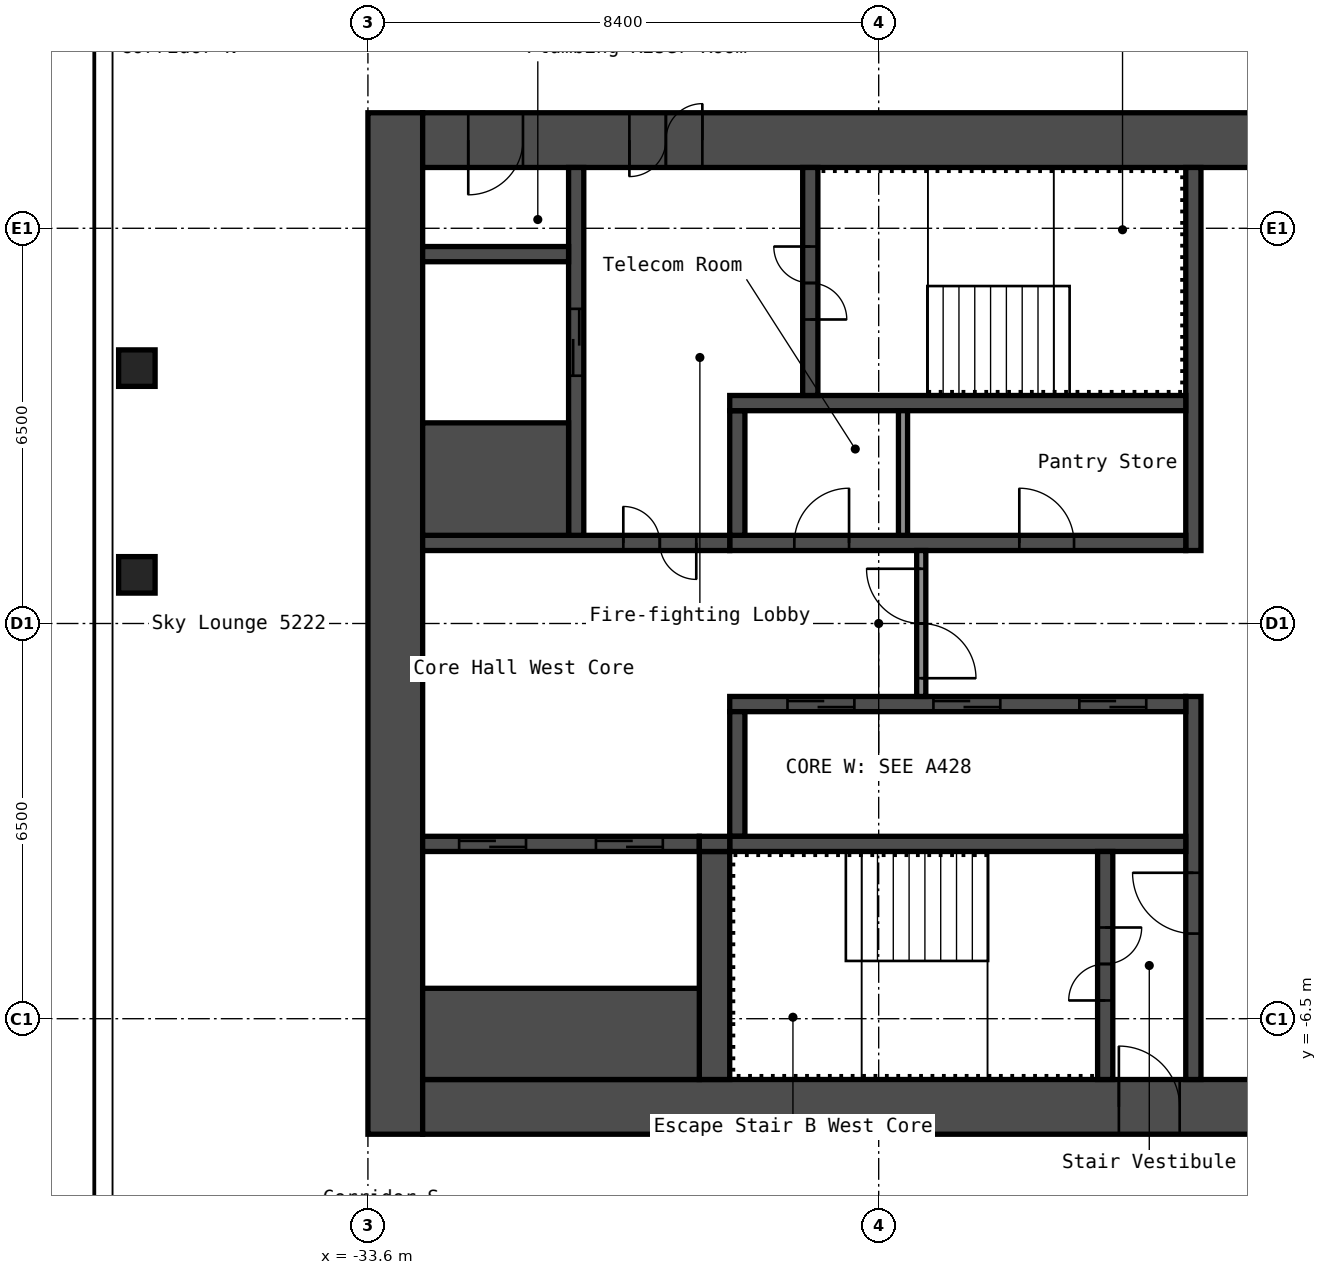
"""IFC4 building model, lengths in metres.
Left out: names, types, materials, properties, quantities, classifications, styles, units other than length and angle.
Written with IfcOpenShell. Run it as: python <this file> out.ifc"""

import sys

from ifc_helpers import new_model, si_unit, direction, frame, frame_2d, origin, origin_2d, place, context, subcontext, project, spatial, rectangle, hollow_rectangle, extrude, element, fill, save


model = new_model("IFC4")
c1 = context("Model", 3, precision=1e-05, world=origin(), true_north=direction((0.0, 1.0)))
c2 = subcontext(c1, "Body", "Model", "MODEL_VIEW")
j1 = project(units=[si_unit("LENGTHUNIT", "METRE"), si_unit("PLANEANGLEUNIT", "RADIAN")], contexts=[c1])
p1 = place(None, origin())
s1 = spatial("IfcSite", under=j1, at=p1, CompositionType="ELEMENT")
p2 = place(p1, origin())
s2 = spatial("IfcBuilding", under=s1, at=p2, CompositionType="ELEMENT")
p3 = place(p2, frame((0.0, 0.0, 186.6)))
s3 = spatial("IfcBuildingStorey", under=s2, at=p3, CompositionType="ELEMENT", Elevation=186.6)
for number, where, z_axis, x_axis in (
    (1, (-37.4, 0.8, 0.0), (0.0, 0.0, 1.0), (1.0, 0.0, 0.0)),
    (2, (-37.4, 4.2, 0.0), (0.0, 0.0, 1.0), (1.0, 0.0, 0.0)),
):
    element("IfcColumn", number, at=place(p3, frame(where, z_axis=z_axis, x_axis=x_axis)), inside=s3, PredefinedType="COLUMN", context=c2, shape_type="SweptSolid", body=[
        extrude(hollow_rectangle(XDim=0.6, YDim=0.6, WallThickness=0.025, InnerFilletRadius=0.038, OuterFilletRadius=0.062, at=origin_2d()), origin(), (0.0, 0.0, 1.0), 2.75),
    ])
p4 = place(p3, frame((-33.15, -8.4, 0.0), z_axis=(0.0, 0.0, 1.0), x_axis=(0.0, 1.0, 0.0)))
e3 = element("IfcWall", 3, at=p4, inside=s3, PredefinedType="SHEAR", context=c2, shape_type="SweptSolid", body=[
    extrude(rectangle(XDim=16.8, YDim=0.9, at=frame_2d((8.4, 0.0))), origin(), (0.0, 0.0, 1.0), 2.75),
])
p5 = place(p3, frame((-32.7, 7.95, 0.0), z_axis=(0.0, 0.0, 1.0), x_axis=(1.0, 0.0, 0.0)))
e4 = element("IfcWall", 4, at=p5, inside=s3, PredefinedType="SHEAR", context=c2, shape_type="SweptSolid", body=[
    extrude(rectangle(XDim=15.0, YDim=0.9, at=frame_2d((7.5, 0.0))), origin(), (0.0, 0.0, 1.0), 2.75),
])
p6 = place(p5, frame((3.4, 0.0, 0.0)))
e5 = element("IfcOpeningElement", 5, at=p6, cuts=e4, PredefinedType="OPENING", context=c2, shape_type="SweptSolid", body=[
    extrude(rectangle(XDim=1.2, YDim=2.1, at=frame_2d((0.6, 1.05))), frame((0.0, 0.46, 0.0), z_axis=(0.0, -1.0, 0.0), x_axis=(1.0, 0.0, 0.0)), (0.0, 0.0, 1.0), 0.92),
])
p7 = place(p5, frame((0.75, 0.0, 0.0)))
e6 = element("IfcOpeningElement", 6, at=p7, cuts=e4, PredefinedType="OPENING", context=c2, shape_type="SweptSolid", body=[
    extrude(rectangle(XDim=0.9, YDim=2.1, at=frame_2d((0.45, 1.05))), frame((0.0, 0.46, 0.0), z_axis=(0.0, -1.0, 0.0), x_axis=(1.0, 0.0, 0.0)), (0.0, 0.0, 1.0), 0.92),
])
p8 = place(p3, frame((-32.7, -7.95, 0.0), z_axis=(0.0, 0.0, 1.0), x_axis=(1.0, 0.0, 0.0)))
e7 = element("IfcWall", 7, at=p8, inside=s3, PredefinedType="SHEAR", context=c2, shape_type="SweptSolid", body=[
    extrude(rectangle(XDim=15.0, YDim=0.9, at=frame_2d((7.5, 0.0))), origin(), (0.0, 0.0, 1.0), 2.75),
])
p9 = place(p8, frame((11.45, 0.0, 0.0)))
e8 = element("IfcOpeningElement", 8, at=p9, cuts=e7, PredefinedType="OPENING", context=c2, shape_type="SweptSolid", body=[
    extrude(rectangle(XDim=1.0, YDim=2.1, at=frame_2d((0.5, 1.05))), frame((0.0, 0.46, 0.0), z_axis=(0.0, -1.0, 0.0), x_axis=(1.0, 0.0, 0.0)), (0.0, 0.0, 1.0), 0.92),
])
p10 = place(p3, frame((-20.025, 1.2, 0.0), z_axis=(0.0, 0.0, 1.0), x_axis=(0.0, 1.0, 0.0)))
e9 = element("IfcWall", 9, at=p10, inside=s3, PredefinedType="SHEAR", context=c2, shape_type="SweptSolid", body=[
    extrude(rectangle(XDim=6.3, YDim=0.25, at=frame_2d((3.15, 0.0))), origin(), (0.0, 0.0, 1.0), 2.75),
])
p11 = place(p3, frame((-20.025, -7.5, 0.0), z_axis=(0.0, 0.0, 1.0), x_axis=(0.0, 1.0, 0.0)))
e10 = element("IfcWall", 10, at=p11, inside=s3, PredefinedType="SHEAR", context=c2, shape_type="SweptSolid", body=[
    extrude(rectangle(XDim=6.3, YDim=0.25, at=frame_2d((3.15, 0.0))), origin(), (0.0, 0.0, 1.0), 2.75),
])
p12 = place(p11, frame((2.4, 0.0, 0.0)))
e11 = element("IfcOpeningElement", 11, at=p12, cuts=e10, PredefinedType="OPENING", context=c2, shape_type="SweptSolid", body=[
    extrude(rectangle(XDim=1.0, YDim=2.1, at=frame_2d((0.5, 1.05))), frame((0.0, 0.135, 0.0), z_axis=(0.0, -1.0, 0.0), x_axis=(1.0, 0.0, 0.0)), (0.0, 0.0, 1.0), 0.27),
])
p13 = place(p3, frame((-27.65, 1.325, 0.0), z_axis=(0.0, 0.0, 1.0), x_axis=(1.0, 0.0, 0.0)))
e12 = element("IfcWall", 12, at=p13, inside=s3, PredefinedType="SHEAR", context=c2, shape_type="SweptSolid", body=[
    extrude(rectangle(XDim=7.5, YDim=0.25, at=frame_2d((3.75, 0.0))), origin(), (0.0, 0.0, 1.0), 2.75),
])
p14 = place(p13, frame((4.762, 0.0, 0.0)))
e13 = element("IfcOpeningElement", 13, at=p14, cuts=e12, PredefinedType="OPENING", context=c2, shape_type="SweptSolid", body=[
    extrude(rectangle(XDim=0.9, YDim=2.1, at=frame_2d((0.45, 1.05))), frame((0.0, 0.135, 0.0), z_axis=(0.0, -1.0, 0.0), x_axis=(1.0, 0.0, 0.0)), (0.0, 0.0, 1.0), 0.27),
])
p15 = place(p13, frame((1.062, 0.0, 0.0)))
e14 = element("IfcOpeningElement", 14, at=p15, cuts=e12, PredefinedType="OPENING", context=c2, shape_type="SweptSolid", body=[
    extrude(rectangle(XDim=0.9, YDim=2.1, at=frame_2d((0.45, 1.05))), frame((0.0, 0.135, 0.0), z_axis=(0.0, -1.0, 0.0), x_axis=(1.0, 0.0, 0.0)), (0.0, 0.0, 1.0), 0.27),
])
p16 = place(p3, frame((-27.525, 1.45, 0.0), z_axis=(0.0, 0.0, 1.0), x_axis=(0.0, 1.0, 0.0)))
e15 = element("IfcWall", 15, at=p16, inside=s3, PredefinedType="SHEAR", context=c2, shape_type="SweptSolid", body=[
    extrude(rectangle(XDim=2.05, YDim=0.25, at=frame_2d((1.025, 0.0))), origin(), (0.0, 0.0, 1.0), 2.75),
])
p17 = place(p3, frame((-27.65, 3.625, 0.0), z_axis=(0.0, 0.0, 1.0), x_axis=(1.0, 0.0, 0.0)))
e16 = element("IfcWall", 16, at=p17, inside=s3, PredefinedType="SHEAR", context=c2, shape_type="SweptSolid", body=[
    extrude(rectangle(XDim=7.5, YDim=0.25, at=frame_2d((3.75, 0.0))), origin(), (0.0, 0.0, 1.0), 2.75),
])
p18 = place(p3, frame((-26.325, 3.75, 0.0), z_axis=(0.0, 0.0, 1.0), x_axis=(0.0, 1.0, 0.0)))
e17 = element("IfcWall", 17, at=p18, inside=s3, PredefinedType="SHEAR", context=c2, shape_type="SweptSolid", body=[
    extrude(rectangle(XDim=3.75, YDim=0.25, at=frame_2d((1.875, 0.0))), origin(), (0.0, 0.0, 1.0), 2.75),
])
p19 = place(p18, frame((1.25, 0.0, 0.0)))
e18 = element("IfcOpeningElement", 18, at=p19, cuts=e17, PredefinedType="OPENING", context=c2, shape_type="SweptSolid", body=[
    extrude(rectangle(XDim=1.2, YDim=2.1, at=frame_2d((0.6, 1.05))), frame((0.0, 0.135, 0.0), z_axis=(0.0, -1.0, 0.0), x_axis=(1.0, 0.0, 0.0)), (0.0, 0.0, 1.0), 0.27),
])
p20 = place(p3, frame((-32.7, 1.325, 0.0), z_axis=(0.0, 0.0, 1.0), x_axis=(1.0, 0.0, 0.0)))
e19 = element("IfcWall", 19, at=p20, inside=s3, PredefinedType="SHEAR", context=c2, shape_type="SweptSolid", body=[
    extrude(rectangle(XDim=5.05, YDim=0.25, at=frame_2d((2.525, 0.0))), origin(), (0.0, 0.0, 1.0), 2.75),
])
p21 = place(p20, frame((3.3, 0.0, 0.0)))
e20 = element("IfcOpeningElement", 20, at=p21, cuts=e19, PredefinedType="OPENING", context=c2, shape_type="SweptSolid", body=[
    extrude(rectangle(XDim=1.2, YDim=2.1, at=frame_2d((0.6, 1.05))), frame((0.0, 0.135, 0.0), z_axis=(0.0, -1.0, 0.0), x_axis=(1.0, 0.0, 0.0)), (0.0, 0.0, 1.0), 0.27),
])
p22 = place(p3, frame((-30.175, 1.45, 0.0), z_axis=(0.0, 0.0, 1.0), x_axis=(0.0, 1.0, 0.0)))
e21 = element("IfcWall", 21, at=p22, inside=s3, PredefinedType="SHEAR", context=c2, shape_type="SweptSolid", body=[
    extrude(rectangle(XDim=6.05, YDim=0.25, at=frame_2d((3.025, 0.0))), origin(), (0.0, 0.0, 1.0), 2.75),
])
p23 = place(p22, frame((2.625, 0.0, 0.0)))
e22 = element("IfcOpeningElement", 22, at=p23, cuts=e21, PredefinedType="OPENING", context=c2, shape_type="SweptSolid", body=[
    extrude(rectangle(XDim=1.1, YDim=2.1, at=frame_2d((0.55, 1.05))), frame((0.0, 0.135, 0.0), z_axis=(0.0, -1.0, 0.0), x_axis=(1.0, 0.0, 0.0)), (0.0, 0.0, 1.0), 0.27),
])
p24 = place(p3, frame((-32.7, 2.375, 0.0), z_axis=(0.0, 0.0, 1.0), x_axis=(1.0, 0.0, 0.0)))
e23 = element("IfcWall", 23, at=p24, inside=s3, PredefinedType="SHEAR", context=c2, shape_type="SweptSolid", body=[
    extrude(rectangle(XDim=2.4, YDim=1.85, at=frame_2d((1.2, 0.0))), origin(), (0.0, 0.0, 1.0), 2.75),
])
p25 = place(p3, frame((-32.7, 6.075, 0.0), z_axis=(0.0, 0.0, 1.0), x_axis=(1.0, 0.0, 0.0)))
e24 = element("IfcWall", 24, at=p25, inside=s3, PredefinedType="SHEAR", context=c2, shape_type="SweptSolid", body=[
    extrude(rectangle(XDim=2.4, YDim=0.25, at=frame_2d((1.2, 0.0))), origin(), (0.0, 0.0, 1.0), 2.75),
])
p26 = place(p3, frame((-27.65, -1.325, 0.0), z_axis=(0.0, 0.0, 1.0), x_axis=(1.0, 0.0, 0.0)))
e25 = element("IfcWall", 25, at=p26, inside=s3, PredefinedType="SHEAR", context=c2, shape_type="SweptSolid", body=[
    extrude(rectangle(XDim=7.5, YDim=0.25, at=frame_2d((3.75, 0.0))), origin(), (0.0, 0.0, 1.0), 2.75),
])
p27 = place(p26, frame((5.75, 0.0, 0.0)))
e26 = element("IfcOpeningElement", 26, at=p27, cuts=e25, PredefinedType="OPENING", context=c2, shape_type="SweptSolid", body=[
    extrude(rectangle(XDim=1.1, YDim=2.1, at=frame_2d((0.55, 1.05))), frame((0.0, 0.135, 0.0), z_axis=(0.0, -1.0, 0.0), x_axis=(1.0, 0.0, 0.0)), (0.0, 0.0, 1.0), 0.27),
])
p28 = place(p26, frame((3.35, 0.0, 0.0)))
e27 = element("IfcOpeningElement", 27, at=p28, cuts=e25, PredefinedType="OPENING", context=c2, shape_type="SweptSolid", body=[
    extrude(rectangle(XDim=1.1, YDim=2.1, at=frame_2d((0.55, 1.05))), frame((0.0, 0.135, 0.0), z_axis=(0.0, -1.0, 0.0), x_axis=(1.0, 0.0, 0.0)), (0.0, 0.0, 1.0), 0.27),
])
p29 = place(p26, frame((0.95, 0.0, 0.0)))
e28 = element("IfcOpeningElement", 28, at=p29, cuts=e25, PredefinedType="OPENING", context=c2, shape_type="SweptSolid", body=[
    extrude(rectangle(XDim=1.1, YDim=2.1, at=frame_2d((0.55, 1.05))), frame((0.0, 0.135, 0.0), z_axis=(0.0, -1.0, 0.0), x_axis=(1.0, 0.0, 0.0)), (0.0, 0.0, 1.0), 0.27),
])
p30 = place(p3, frame((-27.525, -3.5, 0.0), z_axis=(0.0, 0.0, 1.0), x_axis=(0.0, 1.0, 0.0)))
e29 = element("IfcWall", 29, at=p30, inside=s3, PredefinedType="SHEAR", context=c2, shape_type="SweptSolid", body=[
    extrude(rectangle(XDim=2.05, YDim=0.25, at=frame_2d((1.025, 0.0))), origin(), (0.0, 0.0, 1.0), 2.75),
])
p31 = place(p3, frame((-27.65, -3.625, 0.0), z_axis=(0.0, 0.0, 1.0), x_axis=(1.0, 0.0, 0.0)))
e30 = element("IfcWall", 30, at=p31, inside=s3, PredefinedType="SHEAR", context=c2, shape_type="SweptSolid", body=[
    extrude(rectangle(XDim=7.5, YDim=0.25, at=frame_2d((3.75, 0.0))), origin(), (0.0, 0.0, 1.0), 2.75),
])
p32 = place(p3, frame((-21.475, -7.5, 0.0), z_axis=(0.0, 0.0, 1.0), x_axis=(0.0, 1.0, 0.0)))
e31 = element("IfcWall", 31, at=p32, inside=s3, PredefinedType="SHEAR", context=c2, shape_type="SweptSolid", body=[
    extrude(rectangle(XDim=3.75, YDim=0.25, at=frame_2d((1.875, 0.0))), origin(), (0.0, 0.0, 1.0), 2.75),
])
p33 = place(p32, frame((1.3, 0.0, 0.0)))
e32 = element("IfcOpeningElement", 32, at=p33, cuts=e31, PredefinedType="OPENING", context=c2, shape_type="SweptSolid", body=[
    extrude(rectangle(XDim=1.2, YDim=2.1, at=frame_2d((0.6, 1.05))), frame((0.0, 0.135, 0.0), z_axis=(0.0, -1.0, 0.0), x_axis=(1.0, 0.0, 0.0)), (0.0, 0.0, 1.0), 0.27),
])
p34 = place(p3, frame((-27.9, -7.5, 0.0), z_axis=(0.0, 0.0, 1.0), x_axis=(0.0, 1.0, 0.0)))
e33 = element("IfcWall", 33, at=p34, inside=s3, PredefinedType="SHEAR", context=c2, shape_type="SweptSolid", body=[
    extrude(rectangle(XDim=3.75, YDim=0.5, at=frame_2d((1.875, 0.0))), origin(), (0.0, 0.0, 1.0), 2.75),
])
p35 = place(p3, frame((-32.7, -3.625, 0.0), z_axis=(0.0, 0.0, 1.0), x_axis=(1.0, 0.0, 0.0)))
e34 = element("IfcWall", 34, at=p35, inside=s3, PredefinedType="SHEAR", context=c2, shape_type="SweptSolid", body=[
    extrude(rectangle(XDim=4.55, YDim=0.25, at=frame_2d((2.275, 0.0))), origin(), (0.0, 0.0, 1.0), 2.75),
])
p36 = place(p35, frame((2.85, 0.0, 0.0)))
e35 = element("IfcOpeningElement", 35, at=p36, cuts=e34, PredefinedType="OPENING", context=c2, shape_type="SweptSolid", body=[
    extrude(rectangle(XDim=1.1, YDim=2.1, at=frame_2d((0.55, 1.05))), frame((0.0, 0.135, 0.0), z_axis=(0.0, -1.0, 0.0), x_axis=(1.0, 0.0, 0.0)), (0.0, 0.0, 1.0), 0.27),
])
p37 = place(p35, frame((0.6, 0.0, 0.0)))
e36 = element("IfcOpeningElement", 36, at=p37, cuts=e34, PredefinedType="OPENING", context=c2, shape_type="SweptSolid", body=[
    extrude(rectangle(XDim=1.1, YDim=2.1, at=frame_2d((0.55, 1.05))), frame((0.0, 0.135, 0.0), z_axis=(0.0, -1.0, 0.0), x_axis=(1.0, 0.0, 0.0)), (0.0, 0.0, 1.0), 0.27),
])
p38 = place(p3, frame((-32.7, -6.75, 0.0), z_axis=(0.0, 0.0, 1.0), x_axis=(1.0, 0.0, 0.0)))
e37 = element("IfcWall", 37, at=p38, inside=s3, PredefinedType="SHEAR", context=c2, shape_type="SweptSolid", body=[
    extrude(rectangle(XDim=4.55, YDim=1.5, at=frame_2d((2.275, 0.0))), origin(), (0.0, 0.0, 1.0), 2.75),
])
p39 = place(p3, frame((-28.15, -3.625, 0.0), z_axis=(0.0, 0.0, 1.0), x_axis=(1.0, 0.0, 0.0)))
e38 = element("IfcWall", 38, at=p39, inside=s3, PredefinedType="SHEAR", context=c2, shape_type="SweptSolid", body=[
    extrude(rectangle(XDim=0.5, YDim=0.25, at=frame_2d((0.25, 0.0))), origin(), (0.0, 0.0, 1.0), 2.75),
])
p40 = place(p3, frame((-24.5, -1.2, 0.0), z_axis=(0.0, 0.0, 1.0), x_axis=(0.0, 1.0, 0.0)))
e39 = element("IfcWall", 39, at=p40, inside=s3, PredefinedType="PARTITIONING", context=c2, shape_type="SweptSolid", body=[
    extrude(rectangle(XDim=2.4, YDim=0.15, at=frame_2d((1.2, 0.0))), origin(), (0.0, 0.0, 1.0), 2.75),
])
p41 = place(p40, frame((0.3, 0.0, 0.0)))
e40 = element("IfcOpeningElement", 40, at=p41, cuts=e39, PredefinedType="OPENING", context=c2, shape_type="SweptSolid", body=[
    extrude(rectangle(XDim=1.8, YDim=2.1, at=frame_2d((0.9, 1.05))), frame((0.0, 0.085, 0.0), z_axis=(0.0, -1.0, 0.0), x_axis=(1.0, 0.0, 0.0)), (0.0, 0.0, 1.0), 0.17),
])
p42 = place(p3, frame((-24.8, 1.45, 0.0), z_axis=(0.0, 0.0, 1.0), x_axis=(0.0, 1.0, 0.0)))
e41 = element("IfcWall", 41, at=p42, inside=s3, PredefinedType="PARTITIONING", context=c2, shape_type="SweptSolid", body=[
    extrude(rectangle(XDim=2.05, YDim=0.15, at=frame_2d((1.025, 0.0))), origin(), (0.0, 0.0, 1.0), 2.75),
])
p43 = place(p6, origin())
e42 = element("IfcDoor", 42, at=p43, inside=s3, OperationType="DOUBLE_DOOR_SINGLE_SWING", PredefinedType="DOOR", context=c2, shape_type="SweptSolid", body=[
    extrude(rectangle(XDim=1.2, YDim=2.1, at=frame_2d((0.6, 1.05))), frame((0.0, 0.025, 0.0), z_axis=(0.0, -1.0, 0.0), x_axis=(1.0, 0.0, 0.0)), (0.0, 0.0, 1.0), 0.05),
])
fill(e5, e42)
p44 = place(p7, origin())
e43 = element("IfcDoor", 43, at=p44, inside=s3, OperationType="SINGLE_SWING_LEFT", PredefinedType="DOOR", context=c2, shape_type="SweptSolid", body=[
    extrude(rectangle(XDim=0.9, YDim=2.1, at=frame_2d((0.45, 1.05))), frame((0.0, 0.025, 0.0), z_axis=(0.0, -1.0, 0.0), x_axis=(1.0, 0.0, 0.0)), (0.0, 0.0, 1.0), 0.05),
])
fill(e6, e43)
p45 = place(p9, origin())
e44 = element("IfcDoor", 44, at=p45, inside=s3, OperationType="SINGLE_SWING_RIGHT", PredefinedType="DOOR", context=c2, shape_type="SweptSolid", body=[
    extrude(rectangle(XDim=1.0, YDim=2.1, at=frame_2d((0.5, 1.05))), frame((0.0, 0.025, 0.0), z_axis=(0.0, -1.0, 0.0), x_axis=(1.0, 0.0, 0.0)), (0.0, 0.0, 1.0), 0.05),
])
fill(e8, e44)
p46 = place(p19, origin())
e45 = element("IfcDoor", 45, at=p46, inside=s3, OperationType="DOUBLE_DOOR_SINGLE_SWING", PredefinedType="DOOR", context=c2, shape_type="SweptSolid", body=[
    extrude(rectangle(XDim=1.2, YDim=2.1, at=frame_2d((0.6, 1.05))), frame((0.0, 0.025, 0.0), z_axis=(0.0, -1.0, 0.0), x_axis=(1.0, 0.0, 0.0)), (0.0, 0.0, 1.0), 0.05),
])
fill(e18, e45)
p47 = place(p33, origin())
e46 = element("IfcDoor", 46, at=p47, inside=s3, OperationType="DOUBLE_DOOR_SINGLE_SWING", PredefinedType="DOOR", context=c2, shape_type="SweptSolid", body=[
    extrude(rectangle(XDim=1.2, YDim=2.1, at=frame_2d((0.6, 1.05))), frame((0.0, 0.025, 0.0), z_axis=(0.0, -1.0, 0.0), x_axis=(1.0, 0.0, 0.0)), (0.0, 0.0, 1.0), 0.05),
])
fill(e32, e46)
p48 = place(p12, origin())
e47 = element("IfcDoor", 47, at=p48, inside=s3, OperationType="SINGLE_SWING_LEFT", PredefinedType="DOOR", context=c2, shape_type="SweptSolid", body=[
    extrude(rectangle(XDim=1.0, YDim=2.1, at=frame_2d((0.5, 1.05))), frame((0.0, 0.025, 0.0), z_axis=(0.0, -1.0, 0.0), x_axis=(1.0, 0.0, 0.0)), (0.0, 0.0, 1.0), 0.05),
])
fill(e11, e47)
p49 = place(p21, origin())
e48 = element("IfcDoor", 48, at=p49, inside=s3, OperationType="DOUBLE_DOOR_SINGLE_SWING", PredefinedType="DOOR", context=c2, shape_type="SweptSolid", body=[
    extrude(rectangle(XDim=1.2, YDim=2.1, at=frame_2d((0.6, 1.05))), frame((0.0, 0.025, 0.0), z_axis=(0.0, -1.0, 0.0), x_axis=(1.0, 0.0, 0.0)), (0.0, 0.0, 1.0), 0.05),
])
fill(e20, e48)
p50 = place(p41, origin())
e49 = element("IfcDoor", 49, at=p50, inside=s3, OperationType="DOUBLE_DOOR_SINGLE_SWING", PredefinedType="DOOR", context=c2, shape_type="SweptSolid", body=[
    extrude(rectangle(XDim=1.8, YDim=2.1, at=frame_2d((0.9, 1.05))), frame((0.0, 0.025, 0.0), z_axis=(0.0, -1.0, 0.0), x_axis=(1.0, 0.0, 0.0)), (0.0, 0.0, 1.0), 0.05),
])
fill(e40, e49)
p51 = place(p14, origin())
e50 = element("IfcDoor", 50, at=p51, inside=s3, OperationType="SINGLE_SWING_RIGHT", PredefinedType="DOOR", context=c2, shape_type="SweptSolid", body=[
    extrude(rectangle(XDim=0.9, YDim=2.1, at=frame_2d((0.45, 1.05))), frame((0.0, 0.025, 0.0), z_axis=(0.0, -1.0, 0.0), x_axis=(1.0, 0.0, 0.0)), (0.0, 0.0, 1.0), 0.05),
])
fill(e13, e50)
p52 = place(p15, origin())
e51 = element("IfcDoor", 51, at=p52, inside=s3, OperationType="SINGLE_SWING_LEFT", PredefinedType="DOOR", context=c2, shape_type="SweptSolid", body=[
    extrude(rectangle(XDim=0.9, YDim=2.1, at=frame_2d((0.45, 1.05))), frame((0.0, 0.025, 0.0), z_axis=(0.0, -1.0, 0.0), x_axis=(1.0, 0.0, 0.0)), (0.0, 0.0, 1.0), 0.05),
])
fill(e14, e51)
p53 = place(p27, origin())
e52 = element("IfcDoor", 52, at=p53, inside=s3, OperationType="DOUBLE_DOOR_SLIDING", PredefinedType="DOOR", context=c2, shape_type="SweptSolid", body=[
    extrude(rectangle(XDim=1.1, YDim=2.1, at=frame_2d((0.55, 1.05))), frame((0.0, 0.025, 0.0), z_axis=(0.0, -1.0, 0.0), x_axis=(1.0, 0.0, 0.0)), (0.0, 0.0, 1.0), 0.05),
])
fill(e26, e52)
p54 = place(p28, origin())
e53 = element("IfcDoor", 53, at=p54, inside=s3, OperationType="DOUBLE_DOOR_SLIDING", PredefinedType="DOOR", context=c2, shape_type="SweptSolid", body=[
    extrude(rectangle(XDim=1.1, YDim=2.1, at=frame_2d((0.55, 1.05))), frame((0.0, 0.025, 0.0), z_axis=(0.0, -1.0, 0.0), x_axis=(1.0, 0.0, 0.0)), (0.0, 0.0, 1.0), 0.05),
])
fill(e27, e53)
p55 = place(p29, origin())
e54 = element("IfcDoor", 54, at=p55, inside=s3, OperationType="DOUBLE_DOOR_SLIDING", PredefinedType="DOOR", context=c2, shape_type="SweptSolid", body=[
    extrude(rectangle(XDim=1.1, YDim=2.1, at=frame_2d((0.55, 1.05))), frame((0.0, 0.025, 0.0), z_axis=(0.0, -1.0, 0.0), x_axis=(1.0, 0.0, 0.0)), (0.0, 0.0, 1.0), 0.05),
])
fill(e28, e54)
p56 = place(p23, origin())
e55 = element("IfcDoor", 55, at=p56, inside=s3, OperationType="DOUBLE_DOOR_SLIDING", PredefinedType="DOOR", context=c2, shape_type="SweptSolid", body=[
    extrude(rectangle(XDim=1.1, YDim=2.1, at=frame_2d((0.55, 1.05))), frame((0.0, 0.025, 0.0), z_axis=(0.0, -1.0, 0.0), x_axis=(1.0, 0.0, 0.0)), (0.0, 0.0, 1.0), 0.05),
])
fill(e22, e55)
p57 = place(p36, origin())
e56 = element("IfcDoor", 56, at=p57, inside=s3, OperationType="DOUBLE_DOOR_SLIDING", PredefinedType="DOOR", context=c2, shape_type="SweptSolid", body=[
    extrude(rectangle(XDim=1.1, YDim=2.1, at=frame_2d((0.55, 1.05))), frame((0.0, 0.025, 0.0), z_axis=(0.0, -1.0, 0.0), x_axis=(1.0, 0.0, 0.0)), (0.0, 0.0, 1.0), 0.05),
])
fill(e35, e56)
p58 = place(p37, origin())
e57 = element("IfcDoor", 57, at=p58, inside=s3, OperationType="DOUBLE_DOOR_SLIDING", PredefinedType="DOOR", context=c2, shape_type="SweptSolid", body=[
    extrude(rectangle(XDim=1.1, YDim=2.1, at=frame_2d((0.55, 1.05))), frame((0.0, 0.025, 0.0), z_axis=(0.0, -1.0, 0.0), x_axis=(1.0, 0.0, 0.0)), (0.0, 0.0, 1.0), 0.05),
])
fill(e36, e57)
save(model, sys.argv[1])
